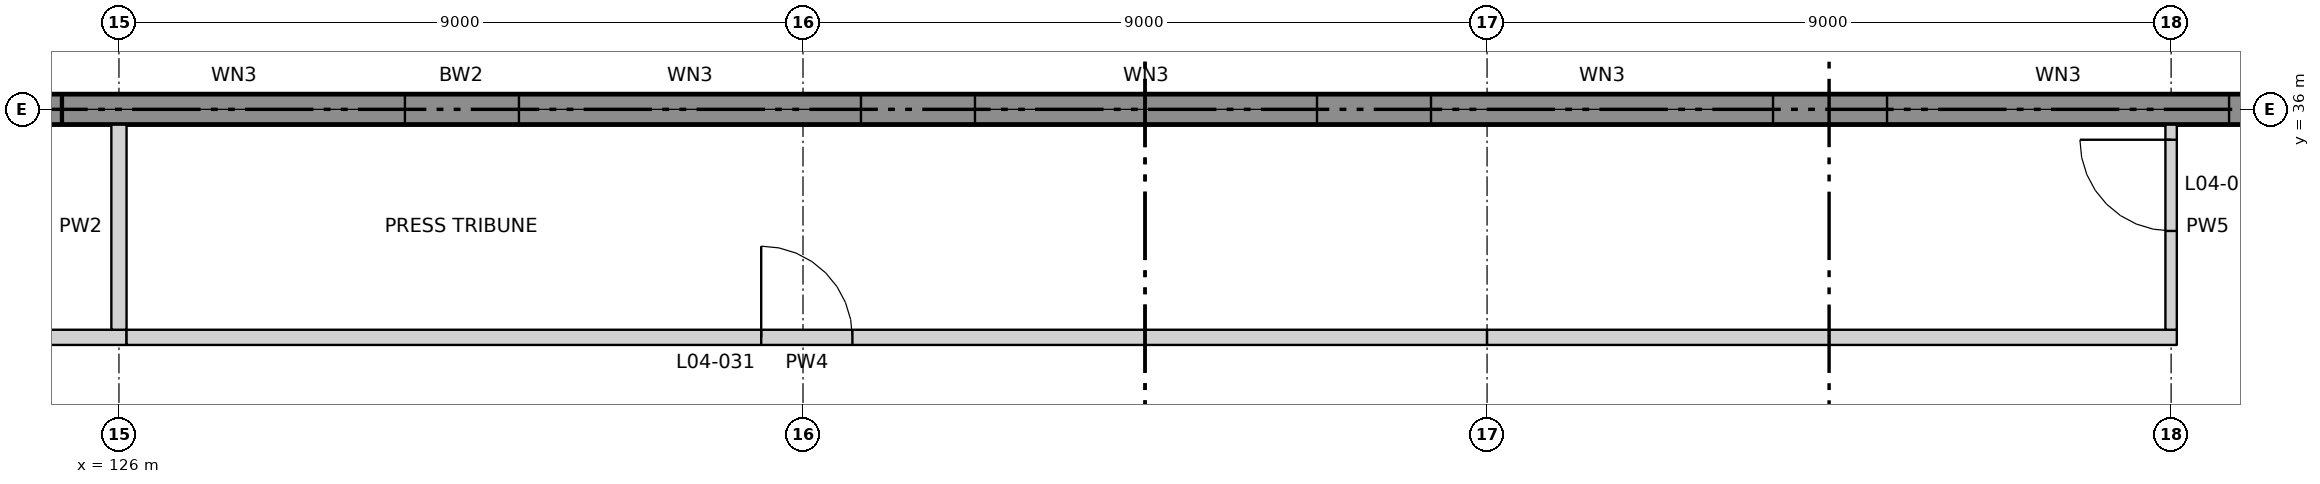
"""IFC4 building model, lengths in metres.
Left out: names, types, materials, properties, quantities, classifications, styles, units other than length and angle.
Written with IfcOpenShell. Run it as: python <this file> out.ifc"""

import sys

from ifc_helpers import new_model, si_unit, direction, frame, frame_2d, origin, place, context, subcontext, project, spatial, rectangle, extrude, element, fill, save


model = new_model("IFC4")
c1 = context("Model", 3, precision=1e-05, world=origin(), true_north=direction((0.0, 1.0)))
c2 = subcontext(c1, "Body", "Model", "MODEL_VIEW")
j1 = project(units=[si_unit("LENGTHUNIT", "METRE"), si_unit("PLANEANGLEUNIT", "RADIAN")], contexts=[c1])
p1 = place(None, origin())
s1 = spatial("IfcSite", under=j1, at=p1, CompositionType="ELEMENT")
p2 = place(p1, origin())
s2 = spatial("IfcBuilding", under=s1, at=p2, CompositionType="ELEMENT")
p3 = place(p2, frame((0.0, 0.0, 28.0)))
s3 = spatial("IfcBuildingStorey", under=s2, at=p3, CompositionType="ELEMENT", Elevation=28.0)
p4 = place(p3, frame((90.0, 36.0, 0.0), z_axis=(0.0, 0.0, 1.0), x_axis=(1.0, 0.0, 0.0)))
e1 = element("IfcWall", 1, at=p4, inside=s3, PredefinedType="SOLIDWALL", context=c2, shape_type="SweptSolid", body=[
    extrude(rectangle(XDim=81.0, YDim=0.4, at=frame_2d((40.5, 0.0))), origin(), (0.0, 0.0, 1.0), 5.5),
])
p5 = place(p4, frame((1.962, 0.0, 0.9)))
e2 = element("IfcOpeningElement", 2, at=p5, cuts=e1, PredefinedType="OPENING", context=c2, shape_type="SweptSolid", body=[
    extrude(rectangle(XDim=3.0, YDim=1.8, at=frame_2d((1.5, 0.9))), frame((0.0, 0.21, 0.0), z_axis=(0.0, -1.0, 0.0), x_axis=(1.0, 0.0, 0.0)), (0.0, 0.0, 1.0), 0.42),
])
p6 = place(p4, frame((5.25, 0.0, 0.9)))
e3 = element("IfcOpeningElement", 3, at=p6, cuts=e1, PredefinedType="OPENING", context=c2, shape_type="SweptSolid", body=[
    extrude(rectangle(XDim=3.0, YDim=1.8, at=frame_2d((1.5, 0.9))), frame((0.0, 0.21, 0.0), z_axis=(0.0, -1.0, 0.0), x_axis=(1.0, 0.0, 0.0)), (0.0, 0.0, 1.0), 0.42),
])
p7 = place(p4, frame((9.75, 0.0, 0.9)))
e4 = element("IfcOpeningElement", 4, at=p7, cuts=e1, PredefinedType="OPENING", context=c2, shape_type="SweptSolid", body=[
    extrude(rectangle(XDim=3.0, YDim=1.8, at=frame_2d((1.5, 0.9))), frame((0.0, 0.21, 0.0), z_axis=(0.0, -1.0, 0.0), x_axis=(1.0, 0.0, 0.0)), (0.0, 0.0, 1.0), 0.42),
])
p8 = place(p4, frame((14.25, 0.0, 0.9)))
e5 = element("IfcOpeningElement", 5, at=p8, cuts=e1, PredefinedType="OPENING", context=c2, shape_type="SweptSolid", body=[
    extrude(rectangle(XDim=3.0, YDim=1.8, at=frame_2d((1.5, 0.9))), frame((0.0, 0.21, 0.0), z_axis=(0.0, -1.0, 0.0), x_axis=(1.0, 0.0, 0.0)), (0.0, 0.0, 1.0), 0.42),
])
p9 = place(p4, frame((18.75, 0.0, 0.9)))
e6 = element("IfcOpeningElement", 6, at=p9, cuts=e1, PredefinedType="OPENING", context=c2, shape_type="SweptSolid", body=[
    extrude(rectangle(XDim=3.0, YDim=1.8, at=frame_2d((1.5, 0.9))), frame((0.0, 0.21, 0.0), z_axis=(0.0, -1.0, 0.0), x_axis=(1.0, 0.0, 0.0)), (0.0, 0.0, 1.0), 0.42),
])
p10 = place(p4, frame((23.25, 0.0, 0.9)))
e7 = element("IfcOpeningElement", 7, at=p10, cuts=e1, PredefinedType="OPENING", context=c2, shape_type="SweptSolid", body=[
    extrude(rectangle(XDim=3.0, YDim=1.8, at=frame_2d((1.5, 0.9))), frame((0.0, 0.21, 0.0), z_axis=(0.0, -1.0, 0.0), x_axis=(1.0, 0.0, 0.0)), (0.0, 0.0, 1.0), 0.42),
])
p11 = place(p4, frame((27.75, 0.0, 0.9)))
e8 = element("IfcOpeningElement", 8, at=p11, cuts=e1, PredefinedType="OPENING", context=c2, shape_type="SweptSolid", body=[
    extrude(rectangle(XDim=3.0, YDim=1.8, at=frame_2d((1.5, 0.9))), frame((0.0, 0.21, 0.0), z_axis=(0.0, -1.0, 0.0), x_axis=(1.0, 0.0, 0.0)), (0.0, 0.0, 1.0), 0.42),
])
p12 = place(p4, frame((32.238, 0.0, 0.9)))
e9 = element("IfcOpeningElement", 9, at=p12, cuts=e1, PredefinedType="OPENING", context=c2, shape_type="SweptSolid", body=[
    extrude(rectangle(XDim=3.0, YDim=1.8, at=frame_2d((1.5, 0.9))), frame((0.0, 0.21, 0.0), z_axis=(0.0, -1.0, 0.0), x_axis=(1.0, 0.0, 0.0)), (0.0, 0.0, 1.0), 0.42),
])
p13 = place(p4, frame((35.262, 0.0, 0.9)))
e10 = element("IfcOpeningElement", 10, at=p13, cuts=e1, PredefinedType="OPENING", context=c2, shape_type="SweptSolid", body=[
    extrude(rectangle(XDim=4.5, YDim=1.8, at=frame_2d((2.25, 0.9))), frame((0.0, 0.21, 0.0), z_axis=(0.0, -1.0, 0.0), x_axis=(1.0, 0.0, 0.0)), (0.0, 0.0, 1.0), 0.42),
])
p14 = place(p4, frame((41.262, 0.0, 0.9)))
e11 = element("IfcOpeningElement", 11, at=p14, cuts=e1, PredefinedType="OPENING", context=c2, shape_type="SweptSolid", body=[
    extrude(rectangle(XDim=4.5, YDim=1.8, at=frame_2d((2.25, 0.9))), frame((0.0, 0.21, 0.0), z_axis=(0.0, -1.0, 0.0), x_axis=(1.0, 0.0, 0.0)), (0.0, 0.0, 1.0), 0.42),
])
p15 = place(p4, frame((47.262, 0.0, 0.9)))
e12 = element("IfcOpeningElement", 12, at=p15, cuts=e1, PredefinedType="OPENING", context=c2, shape_type="SweptSolid", body=[
    extrude(rectangle(XDim=4.5, YDim=1.8, at=frame_2d((2.25, 0.9))), frame((0.0, 0.21, 0.0), z_axis=(0.0, -1.0, 0.0), x_axis=(1.0, 0.0, 0.0)), (0.0, 0.0, 1.0), 0.42),
])
p16 = place(p4, frame((53.262, 0.0, 0.9)))
e13 = element("IfcOpeningElement", 13, at=p16, cuts=e1, PredefinedType="OPENING", context=c2, shape_type="SweptSolid", body=[
    extrude(rectangle(XDim=4.5, YDim=1.8, at=frame_2d((2.25, 0.9))), frame((0.0, 0.21, 0.0), z_axis=(0.0, -1.0, 0.0), x_axis=(1.0, 0.0, 0.0)), (0.0, 0.0, 1.0), 0.42),
])
p17 = place(p4, frame((59.262, 0.0, 0.9)))
e14 = element("IfcOpeningElement", 14, at=p17, cuts=e1, PredefinedType="OPENING", context=c2, shape_type="SweptSolid", body=[
    extrude(rectangle(XDim=4.5, YDim=1.8, at=frame_2d((2.25, 0.9))), frame((0.0, 0.21, 0.0), z_axis=(0.0, -1.0, 0.0), x_axis=(1.0, 0.0, 0.0)), (0.0, 0.0, 1.0), 0.42),
])
p18 = place(p4, frame((75.9, 0.0, 0.0)))
e15 = element("IfcOpeningElement", 15, at=p18, cuts=e1, PredefinedType="OPENING", context=c2, shape_type="SweptSolid", body=[
    extrude(rectangle(XDim=1.2, YDim=2.1, at=frame_2d((0.6, 1.05))), frame((0.0, 0.21, 0.0), z_axis=(0.0, -1.0, 0.0), x_axis=(1.0, 0.0, 0.0)), (0.0, 0.0, 1.0), 0.42),
])
p19 = place(p4, frame((0.6, 0.0, 0.0)))
e16 = element("IfcOpeningElement", 16, at=p19, cuts=e1, PredefinedType="OPENING", context=c2, shape_type="SweptSolid", body=[
    extrude(rectangle(XDim=1.2, YDim=2.1, at=frame_2d((0.6, 1.05))), frame((0.0, 0.21, 0.0), z_axis=(0.0, -1.0, 0.0), x_axis=(1.0, 0.0, 0.0)), (0.0, 0.0, 1.0), 0.42),
])
p20 = place(p3, frame((121.575, 33.0, 0.0), z_axis=(0.0, 0.0, 1.0), x_axis=(1.0, 0.0, 0.0)))
e17 = element("IfcWall", 17, at=p20, inside=s3, PredefinedType="PARTITIONING", context=c2, shape_type="SweptSolid", body=[
    extrude(rectangle(XDim=4.525, YDim=0.2, at=frame_2d((2.263, 0.0))), origin(), (0.0, 0.0, 1.0), 5.5),
])
p21 = place(p20, frame((1.762, 0.0, 0.0)))
e18 = element("IfcOpeningElement", 18, at=p21, cuts=e17, PredefinedType="OPENING", context=c2, shape_type="SweptSolid", body=[
    extrude(rectangle(XDim=1.0, YDim=2.1, at=frame_2d((0.5, 1.05))), frame((0.0, 0.11, 0.0), z_axis=(0.0, -1.0, 0.0), x_axis=(1.0, 0.0, 0.0)), (0.0, 0.0, 1.0), 0.22),
])
p22 = place(p3, frame((126.1, 33.0, 0.0), z_axis=(0.0, 0.0, 1.0), x_axis=(1.0, 0.0, 0.0)))
e19 = element("IfcWall", 19, at=p22, inside=s3, PredefinedType="PARTITIONING", context=c2, shape_type="SweptSolid", body=[
    extrude(rectangle(XDim=17.9, YDim=0.2, at=frame_2d((8.95, 0.0))), origin(), (0.0, 0.0, 1.0), 5.5),
])
p23 = place(p22, frame((8.35, 0.0, 0.0)))
e20 = element("IfcOpeningElement", 20, at=p23, cuts=e19, PredefinedType="OPENING", context=c2, shape_type="SweptSolid", body=[
    extrude(rectangle(XDim=1.2, YDim=2.1, at=frame_2d((0.6, 1.05))), frame((0.0, 0.11, 0.0), z_axis=(0.0, -1.0, 0.0), x_axis=(1.0, 0.0, 0.0)), (0.0, 0.0, 1.0), 0.22),
])
p24 = place(p3, frame((144.0, 33.0, 0.0), z_axis=(0.0, 0.0, 1.0), x_axis=(1.0, 0.0, 0.0)))
e21 = element("IfcWall", 21, at=p24, inside=s3, PredefinedType="PARTITIONING", context=c2, shape_type="SweptSolid", body=[
    extrude(rectangle(XDim=9.075, YDim=0.2, at=frame_2d((4.538, 0.0))), origin(), (0.0, 0.0, 1.0), 5.5),
])
p25 = place(p3, frame((126.0, 33.1, 0.0), z_axis=(0.0, 0.0, 1.0), x_axis=(0.0, 1.0, 0.0)))
e22 = element("IfcWall", 22, at=p25, inside=s3, PredefinedType="PARTITIONING", context=c2, shape_type="SweptSolid", body=[
    extrude(rectangle(XDim=2.7, YDim=0.2, at=frame_2d((1.35, 0.0))), origin(), (0.0, 0.0, 1.0), 4.2),
])
p26 = place(p3, frame((153.0, 33.1, 0.0), z_axis=(0.0, 0.0, 1.0), x_axis=(0.0, 1.0, 0.0)))
e23 = element("IfcWall", 23, at=p26, inside=s3, PredefinedType="PARTITIONING", context=c2, shape_type="SweptSolid", body=[
    extrude(rectangle(XDim=2.7, YDim=0.15, at=frame_2d((1.35, 0.0))), origin(), (0.0, 0.0, 1.0), 4.2),
])
p27 = place(p26, frame((1.3, 0.0, 0.0)))
e24 = element("IfcOpeningElement", 24, at=p27, cuts=e23, PredefinedType="OPENING", context=c2, shape_type="SweptSolid", body=[
    extrude(rectangle(XDim=1.2, YDim=2.1, at=frame_2d((0.6, 1.05))), frame((0.0, 0.085, 0.0), z_axis=(0.0, -1.0, 0.0), x_axis=(1.0, 0.0, 0.0)), (0.0, 0.0, 1.0), 0.17),
])
p28 = place(p23, origin())
e25 = element("IfcDoor", 25, at=p28, inside=s3, OperationType="SINGLE_SWING_LEFT", PredefinedType="DOOR", context=c2, shape_type="SweptSolid", body=[
    extrude(rectangle(XDim=1.2, YDim=2.1, at=frame_2d((0.6, 1.05))), frame((0.0, 0.025, 0.0), z_axis=(0.0, -1.0, 0.0), x_axis=(1.0, 0.0, 0.0)), (0.0, 0.0, 1.0), 0.05),
])
fill(e20, e25)
p29 = place(p27, origin())
e26 = element("IfcDoor", 26, at=p29, inside=s3, OperationType="SINGLE_SWING_RIGHT", PredefinedType="DOOR", context=c2, shape_type="SweptSolid", body=[
    extrude(rectangle(XDim=1.2, YDim=2.1, at=frame_2d((0.6, 1.05))), frame((0.0, 0.025, 0.0), z_axis=(0.0, -1.0, 0.0), x_axis=(1.0, 0.0, 0.0)), (0.0, 0.0, 1.0), 0.05),
])
fill(e24, e26)
p30 = place(p12, origin())
e27 = element("IfcWindow", 27, at=p30, inside=s3, PartitioningType="SINGLE_PANEL", PredefinedType="WINDOW", context=c2, shape_type="SweptSolid", body=[
    extrude(rectangle(XDim=3.0, YDim=1.8, at=frame_2d((1.5, 0.9))), frame((0.0, 0.03, 0.0), z_axis=(0.0, -1.0, 0.0), x_axis=(1.0, 0.0, 0.0)), (0.0, 0.0, 1.0), 0.06),
])
fill(e9, e27)
p31 = place(p13, origin())
e28 = element("IfcWindow", 28, at=p31, inside=s3, PartitioningType="SINGLE_PANEL", PredefinedType="WINDOW", context=c2, shape_type="SweptSolid", body=[
    extrude(rectangle(XDim=4.5, YDim=1.8, at=frame_2d((2.25, 0.9))), frame((0.0, 0.03, 0.0), z_axis=(0.0, -1.0, 0.0), x_axis=(1.0, 0.0, 0.0)), (0.0, 0.0, 1.0), 0.06),
])
fill(e10, e28)
p32 = place(p14, origin())
e29 = element("IfcWindow", 29, at=p32, inside=s3, PartitioningType="SINGLE_PANEL", PredefinedType="WINDOW", context=c2, shape_type="SweptSolid", body=[
    extrude(rectangle(XDim=4.5, YDim=1.8, at=frame_2d((2.25, 0.9))), frame((0.0, 0.03, 0.0), z_axis=(0.0, -1.0, 0.0), x_axis=(1.0, 0.0, 0.0)), (0.0, 0.0, 1.0), 0.06),
])
fill(e11, e29)
p33 = place(p15, origin())
e30 = element("IfcWindow", 30, at=p33, inside=s3, PartitioningType="SINGLE_PANEL", PredefinedType="WINDOW", context=c2, shape_type="SweptSolid", body=[
    extrude(rectangle(XDim=4.5, YDim=1.8, at=frame_2d((2.25, 0.9))), frame((0.0, 0.03, 0.0), z_axis=(0.0, -1.0, 0.0), x_axis=(1.0, 0.0, 0.0)), (0.0, 0.0, 1.0), 0.06),
])
fill(e12, e30)
p34 = place(p16, origin())
e31 = element("IfcWindow", 31, at=p34, inside=s3, PartitioningType="SINGLE_PANEL", PredefinedType="WINDOW", context=c2, shape_type="SweptSolid", body=[
    extrude(rectangle(XDim=4.5, YDim=1.8, at=frame_2d((2.25, 0.9))), frame((0.0, 0.03, 0.0), z_axis=(0.0, -1.0, 0.0), x_axis=(1.0, 0.0, 0.0)), (0.0, 0.0, 1.0), 0.06),
])
fill(e13, e31)
p35 = place(p17, origin())
e32 = element("IfcWindow", 32, at=p35, inside=s3, PartitioningType="SINGLE_PANEL", PredefinedType="WINDOW", context=c2, shape_type="SweptSolid", body=[
    extrude(rectangle(XDim=4.5, YDim=1.8, at=frame_2d((2.25, 0.9))), frame((0.0, 0.03, 0.0), z_axis=(0.0, -1.0, 0.0), x_axis=(1.0, 0.0, 0.0)), (0.0, 0.0, 1.0), 0.06),
])
fill(e14, e32)
save(model, sys.argv[1])
